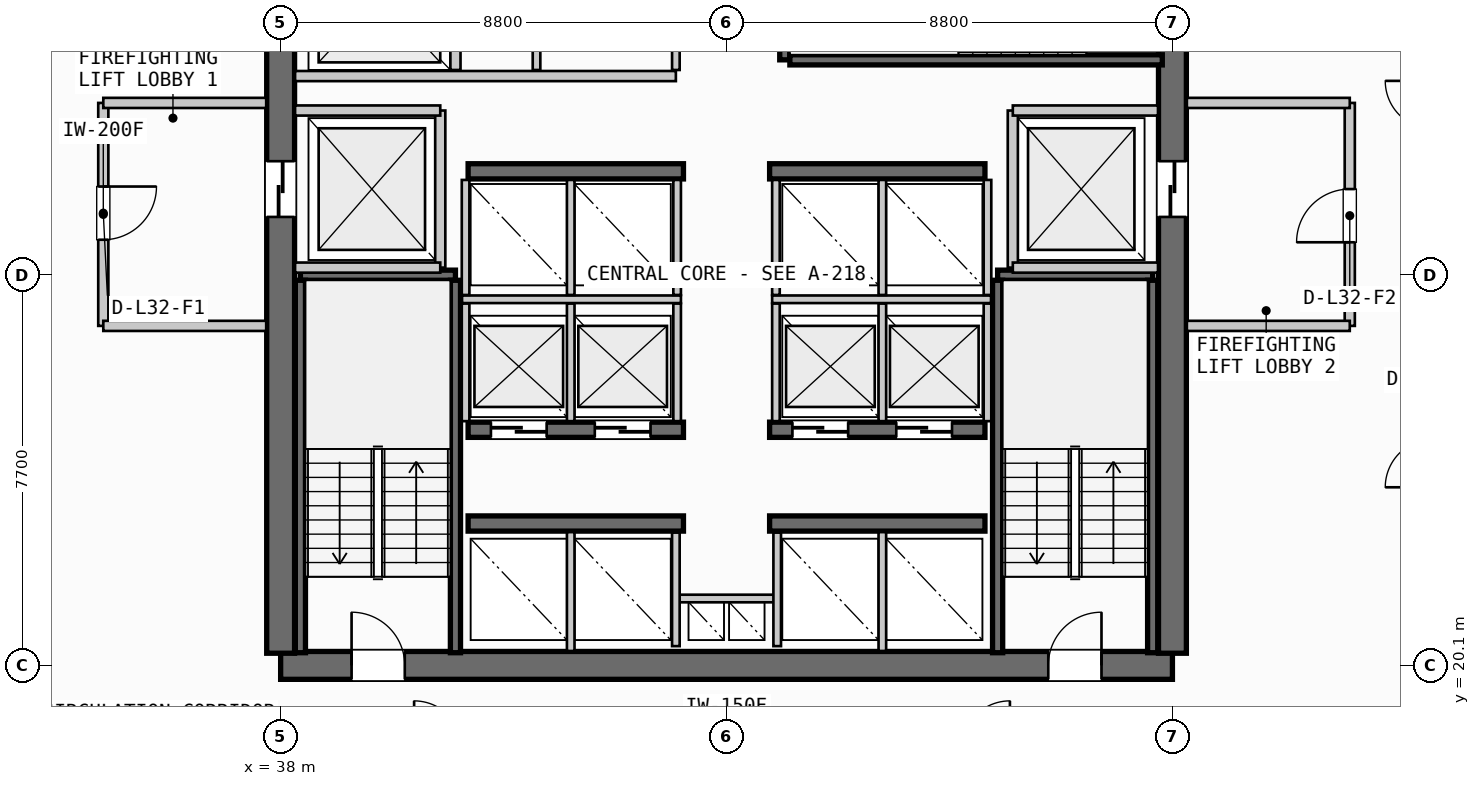
"""IFC4 building model, lengths in metres.
Left out: names, types, materials, properties, quantities, classifications, styles, units other than length and angle.
Written with IfcOpenShell. Run it as: python <this file> out.ifc"""

import sys

from ifc_helpers import new_model, si_unit, direction, frame, frame_2d, origin, place, context, subcontext, project, spatial, rectangle, extrude, source, transform, mapped, element, fill, save


model = new_model("IFC4")
c1 = context("Model", 3, precision=1e-05, world=origin(), true_north=direction((0.0, 1.0)))
c2 = subcontext(c1, "Body", "Model", "MODEL_VIEW")
j1 = project(units=[si_unit("LENGTHUNIT", "METRE"), si_unit("PLANEANGLEUNIT", "RADIAN")], contexts=[c1])
p1 = place(None, origin())
s1 = spatial("IfcSite", under=j1, at=p1, CompositionType="ELEMENT")
p2 = place(p1, origin())
s2 = spatial("IfcBuilding", under=s1, at=p2, CompositionType="ELEMENT")
p3 = place(p2, frame((0.0, 0.0, 128.8)))
s3 = spatial("IfcBuildingStorey", under=s2, at=p3, CompositionType="ELEMENT", Elevation=128.8)
p4 = place(p3, frame((38.0, 20.1, 0.0), z_axis=(0.0, 0.0, 1.0), x_axis=(1.0, 0.0, 0.0)))
e1 = element("IfcWall", 1, at=p4, inside=s3, PredefinedType="SHEAR", context=c2, shape_type="SweptSolid", body=[
    extrude(rectangle(XDim=17.6, YDim=0.55, at=frame_2d((8.8, 0.0))), origin(), (0.0, 0.0, 1.0), 3.3),
])
p5 = place(p4, frame((1.4, 0.0, 0.0)))
e2 = element("IfcOpeningElement", 2, at=p5, cuts=e1, PredefinedType="OPENING", context=c2, shape_type="SweptSolid", body=[
    extrude(rectangle(XDim=1.05, YDim=2.15, at=frame_2d((0.525, 1.075))), frame((0.0, 0.285, 0.0), z_axis=(0.0, -1.0, 0.0), x_axis=(1.0, 0.0, 0.0)), (0.0, 0.0, 1.0), 0.57),
])
p6 = place(p4, frame((15.15, 0.0, 0.0)))
e3 = element("IfcOpeningElement", 3, at=p6, cuts=e1, PredefinedType="OPENING", context=c2, shape_type="SweptSolid", body=[
    extrude(rectangle(XDim=1.05, YDim=2.15, at=frame_2d((0.525, 1.075))), frame((0.0, 0.285, 0.0), z_axis=(0.0, -1.0, 0.0), x_axis=(1.0, 0.0, 0.0)), (0.0, 0.0, 1.0), 0.57),
])
p7 = place(p3, frame((38.0, 35.26, 0.0), z_axis=(0.0, 0.0, 1.0), x_axis=(0.0, -1.0, 0.0)))
e4 = element("IfcWall", 4, at=p7, inside=s3, PredefinedType="SHEAR", context=c2, shape_type="SweptSolid", body=[
    extrude(rectangle(XDim=14.92, YDim=0.55, at=frame_2d((7.46, 0.0))), origin(), (0.0, 0.0, 1.0), 3.3),
])
p8 = place(p7, frame((5.21, 0.0, 0.0)))
e5 = element("IfcOpeningElement", 5, at=p8, cuts=e4, PredefinedType="OPENING", context=c2, shape_type="SweptSolid", body=[
    extrude(rectangle(XDim=1.1, YDim=2.2, at=frame_2d((0.55, 1.1))), frame((0.0, 0.285, 0.0), z_axis=(0.0, -1.0, 0.0), x_axis=(1.0, 0.0, 0.0)), (0.0, 0.0, 1.0), 0.57),
])
p9 = place(p3, frame((55.6, 20.34, 0.0), z_axis=(0.0, 0.0, 1.0), x_axis=(0.0, 1.0, 0.0)))
e6 = element("IfcWall", 6, at=p9, inside=s3, PredefinedType="SHEAR", context=c2, shape_type="SweptSolid", body=[
    extrude(rectangle(XDim=14.92, YDim=0.55, at=frame_2d((7.46, 0.0))), origin(), (0.0, 0.0, 1.0), 3.3),
])
p10 = place(p9, frame((12.71, 0.0, 0.0)))
e7 = element("IfcOpeningElement", 7, at=p10, cuts=e6, PredefinedType="OPENING", context=c2, shape_type="SweptSolid", body=[
    extrude(rectangle(XDim=1.05, YDim=2.15, at=frame_2d((0.525, 1.075))), frame((0.0, 0.285, 0.0), z_axis=(0.0, -1.0, 0.0), x_axis=(1.0, 0.0, 0.0)), (0.0, 0.0, 1.0), 0.57),
])
p11 = place(p9, frame((8.61, 0.0, 0.0)))
e8 = element("IfcOpeningElement", 8, at=p11, cuts=e6, PredefinedType="OPENING", context=c2, shape_type="SweptSolid", body=[
    extrude(rectangle(XDim=1.1, YDim=2.2, at=frame_2d((0.55, 1.1))), frame((0.0, 0.285, 0.0), z_axis=(0.0, -1.0, 0.0), x_axis=(1.0, 0.0, 0.0)), (0.0, 0.0, 1.0), 0.57),
])
for number, where, z_axis, x_axis in (
    (9, (41.7, 22.9, 0.0), (0.0, 0.0, 1.0), (1.0, 0.0, 0.0)),
    (10, (47.65, 22.9, 0.0), (0.0, 0.0, 1.0), (1.0, 0.0, 0.0)),
):
    element("IfcWall", number, at=place(p3, frame(where, z_axis=z_axis, x_axis=x_axis)), inside=s3, PredefinedType="SHEAR", context=c2, shape_type="SweptSolid", body=[
        extrude(rectangle(XDim=4.25, YDim=0.3, at=frame_2d((2.125, 0.0))), origin(), (0.0, 0.0, 1.0), 3.3),
    ])
p12 = place(p3, frame((41.7, 24.75, 0.0), z_axis=(0.0, 0.0, 1.0), x_axis=(1.0, 0.0, 0.0)))
e11 = element("IfcWall", 11, at=p12, inside=s3, PredefinedType="SHEAR", context=c2, shape_type="SweptSolid", body=[
    extrude(rectangle(XDim=4.25, YDim=0.3, at=frame_2d((2.125, 0.0))), origin(), (0.0, 0.0, 1.0), 3.3),
])
p13 = place(p12, frame((0.45, 0.0, 0.0)))
e12 = element("IfcOpeningElement", 12, at=p13, cuts=e11, PredefinedType="OPENING", context=c2, shape_type="SweptSolid", body=[
    extrude(rectangle(XDim=1.1, YDim=2.2, at=frame_2d((0.55, 1.1))), frame((0.0, 0.16, 0.0), z_axis=(0.0, -1.0, 0.0), x_axis=(1.0, 0.0, 0.0)), (0.0, 0.0, 1.0), 0.32),
])
p14 = place(p12, frame((2.5, 0.0, 0.0)))
e13 = element("IfcOpeningElement", 13, at=p14, cuts=e11, PredefinedType="OPENING", context=c2, shape_type="SweptSolid", body=[
    extrude(rectangle(XDim=1.1, YDim=2.2, at=frame_2d((0.55, 1.1))), frame((0.0, 0.16, 0.0), z_axis=(0.0, -1.0, 0.0), x_axis=(1.0, 0.0, 0.0)), (0.0, 0.0, 1.0), 0.32),
])
p15 = place(p3, frame((47.65, 24.75, 0.0), z_axis=(0.0, 0.0, 1.0), x_axis=(1.0, 0.0, 0.0)))
e14 = element("IfcWall", 14, at=p15, inside=s3, PredefinedType="SHEAR", context=c2, shape_type="SweptSolid", body=[
    extrude(rectangle(XDim=4.25, YDim=0.3, at=frame_2d((2.125, 0.0))), origin(), (0.0, 0.0, 1.0), 3.3),
])
p16 = place(p15, frame((0.45, 0.0, 0.0)))
e15 = element("IfcOpeningElement", 15, at=p16, cuts=e14, PredefinedType="OPENING", context=c2, shape_type="SweptSolid", body=[
    extrude(rectangle(XDim=1.1, YDim=2.2, at=frame_2d((0.55, 1.1))), frame((0.0, 0.16, 0.0), z_axis=(0.0, -1.0, 0.0), x_axis=(1.0, 0.0, 0.0)), (0.0, 0.0, 1.0), 0.32),
])
p17 = place(p15, frame((2.5, 0.0, 0.0)))
e16 = element("IfcOpeningElement", 16, at=p17, cuts=e14, PredefinedType="OPENING", context=c2, shape_type="SweptSolid", body=[
    extrude(rectangle(XDim=1.1, YDim=2.2, at=frame_2d((0.55, 1.1))), frame((0.0, 0.16, 0.0), z_axis=(0.0, -1.0, 0.0), x_axis=(1.0, 0.0, 0.0)), (0.0, 0.0, 1.0), 0.32),
])
for number, where, z_axis, x_axis in (
    (17, (41.7, 29.85, 0.0), (0.0, 0.0, 1.0), (1.0, 0.0, 0.0)),
    (18, (47.65, 29.85, 0.0), (0.0, 0.0, 1.0), (1.0, 0.0, 0.0)),
):
    element("IfcWall", number, at=place(p3, frame(where, z_axis=z_axis, x_axis=x_axis)), inside=s3, PredefinedType="SHEAR", context=c2, shape_type="SweptSolid", body=[
        extrude(rectangle(XDim=4.25, YDim=0.3, at=frame_2d((2.125, 0.0))), origin(), (0.0, 0.0, 1.0), 3.3),
    ])
p18 = place(p3, frame((38.39, 27.8, 0.0), z_axis=(0.0, 0.0, 1.0), x_axis=(1.0, 0.0, 0.0)))
e19 = element("IfcWall", 19, at=p18, inside=s3, PredefinedType="SHEAR", context=c2, shape_type="SweptSolid", body=[
    extrude(rectangle(XDim=3.06, YDim=0.2, at=frame_2d((1.53, 0.0))), origin(), (0.0, 0.0, 1.0), 3.3),
])
for number, where, z_axis, x_axis in (
    (20, (41.45, 27.7, 0.0), (0.0, 0.0, 1.0), (0.0, -1.0, 0.0)),
    (21, (38.39, 20.35, 0.0), (0.0, 0.0, 1.0), (0.0, 1.0, 0.0)),
):
    element("IfcWall", number, at=place(p3, frame(where, z_axis=z_axis, x_axis=x_axis)), inside=s3, PredefinedType="SHEAR", context=c2, shape_type="SweptSolid", body=[
        extrude(rectangle(XDim=7.35, YDim=0.2, at=frame_2d((3.675, 0.0))), origin(), (0.0, 0.0, 1.0), 3.3),
    ])
p19 = place(p3, frame((52.15, 27.8, 0.0), z_axis=(0.0, 0.0, 1.0), x_axis=(1.0, 0.0, 0.0)))
e22 = element("IfcWall", 22, at=p19, inside=s3, PredefinedType="SHEAR", context=c2, shape_type="SweptSolid", body=[
    extrude(rectangle(XDim=3.06, YDim=0.2, at=frame_2d((1.53, 0.0))), origin(), (0.0, 0.0, 1.0), 3.3),
])
for number, where, z_axis, x_axis in (
    (23, (55.21, 27.7, 0.0), (0.0, 0.0, 1.0), (0.0, -1.0, 0.0)),
    (24, (52.15, 20.35, 0.0), (0.0, 0.0, 1.0), (0.0, 1.0, 0.0)),
):
    element("IfcWall", number, at=place(p3, frame(where, z_axis=z_axis, x_axis=x_axis)), inside=s3, PredefinedType="SHEAR", context=c2, shape_type="SweptSolid", body=[
        extrude(rectangle(XDim=7.35, YDim=0.2, at=frame_2d((3.675, 0.0))), origin(), (0.0, 0.0, 1.0), 3.3),
    ])
p20 = place(p3, frame((47.95, 32.05, 0.0), z_axis=(0.0, 0.0, 1.0), x_axis=(0.0, 1.0, 0.0)))
e25 = element("IfcWall", 25, at=p20, inside=s3, PredefinedType="SHEAR", context=c2, shape_type="SweptSolid", body=[
    extrude(rectangle(XDim=3.06, YDim=0.2, at=frame_2d((1.53, 0.0))), origin(), (0.0, 0.0, 1.0), 3.3),
])
p21 = place(p3, frame((55.4, 32.05, 0.0), z_axis=(0.0, 0.0, 1.0), x_axis=(-1.0, 0.0, 0.0)))
e26 = element("IfcWall", 26, at=p21, inside=s3, PredefinedType="SHEAR", context=c2, shape_type="SweptSolid", body=[
    extrude(rectangle(XDim=7.35, YDim=0.2, at=frame_2d((3.675, 0.0))), origin(), (0.0, 0.0, 1.0), 3.3),
])
p22 = place(p3, frame((45.8, 21.42, 0.0), z_axis=(0.0, 0.0, 1.0), x_axis=(1.0, 0.0, 0.0)))
e27 = element("IfcWall", 27, at=p22, inside=s3, PredefinedType="PARTITIONING", context=c2, shape_type="SweptSolid", body=[
    extrude(rectangle(XDim=2.0, YDim=0.15, at=frame_2d((1.0, 0.0))), origin(), (0.0, 0.0, 1.0), 2.445),
])
for number, where, z_axis, x_axis in (
    (28, (45.8, 20.48, 0.0), (0.0, 0.0, 1.0), (0.0, 1.0, 0.0)),
    (29, (47.8, 20.48, 0.0), (0.0, 0.0, 1.0), (0.0, 1.0, 0.0)),
):
    element("IfcWall", number, at=place(p3, frame(where, z_axis=z_axis, x_axis=x_axis)), inside=s3, PredefinedType="PARTITIONING", context=c2, shape_type="SweptSolid", body=[
        extrude(rectangle(XDim=2.24, YDim=0.15, at=frame_2d((1.12, 0.0))), origin(), (0.0, 0.0, 1.0), 2.445),
    ])
p23 = place(p3, frame((41.15, 27.95, 0.0), z_axis=(0.0, 0.0, 1.0), x_axis=(0.0, 1.0, 0.0)))
e30 = element("IfcWall", 30, at=p23, inside=s3, PredefinedType="PARTITIONING", context=c2, shape_type="SweptSolid", body=[
    extrude(rectangle(XDim=3.1, YDim=0.2, at=frame_2d((1.55, 0.0))), origin(), (0.0, 0.0, 1.0), 2.445),
])
for number, where, z_axis, x_axis in (
    (31, (38.285, 27.95, 0.0), (0.0, 0.0, 1.0), (1.0, 0.0, 0.0)),
    (32, (38.285, 31.05, 0.0), (0.0, 0.0, 1.0), (1.0, 0.0, 0.0)),
):
    element("IfcWall", number, at=place(p3, frame(where, z_axis=z_axis, x_axis=x_axis)), inside=s3, PredefinedType="PARTITIONING", context=c2, shape_type="SweptSolid", body=[
        extrude(rectangle(XDim=2.865, YDim=0.2, at=frame_2d((1.433, 0.0))), origin(), (0.0, 0.0, 1.0), 2.445),
    ])
p24 = place(p3, frame((34.5, 31.2, 0.0), z_axis=(0.0, 0.0, 1.0), x_axis=(0.0, -1.0, 0.0)))
e33 = element("IfcWall", 33, at=p24, inside=s3, PredefinedType="PARTITIONING", context=c2, shape_type="SweptSolid", body=[
    extrude(rectangle(XDim=4.4, YDim=0.2, at=frame_2d((2.2, 0.0))), origin(), (0.0, 0.0, 1.0), 2.445),
])
p25 = place(p24, frame((1.65, 0.0, 0.0)))
e34 = element("IfcOpeningElement", 34, at=p25, cuts=e33, PredefinedType="OPENING", context=c2, shape_type="SweptSolid", body=[
    extrude(rectangle(XDim=1.05, YDim=2.15, at=frame_2d((0.525, 1.075))), frame((0.0, 0.11, 0.0), z_axis=(0.0, -1.0, 0.0), x_axis=(1.0, 0.0, 0.0)), (0.0, 0.0, 1.0), 0.22),
])
for number, where, z_axis, x_axis in (
    (35, (34.5, 26.8, 0.0), (0.0, 0.0, 1.0), (1.0, 0.0, 0.0)),
    (36, (34.5, 31.2, 0.0), (0.0, 0.0, 1.0), (1.0, 0.0, 0.0)),
):
    element("IfcWall", number, at=place(p3, frame(where, z_axis=z_axis, x_axis=x_axis)), inside=s3, PredefinedType="PARTITIONING", context=c2, shape_type="SweptSolid", body=[
        extrude(rectangle(XDim=3.215, YDim=0.2, at=frame_2d((1.607, 0.0))), origin(), (0.0, 0.0, 1.0), 2.445),
    ])
p26 = place(p3, frame((52.45, 27.95, 0.0), z_axis=(0.0, 0.0, 1.0), x_axis=(0.0, 1.0, 0.0)))
e37 = element("IfcWall", 37, at=p26, inside=s3, PredefinedType="PARTITIONING", context=c2, shape_type="SweptSolid", body=[
    extrude(rectangle(XDim=3.1, YDim=0.2, at=frame_2d((1.55, 0.0))), origin(), (0.0, 0.0, 1.0), 2.445),
])
for number, where, z_axis, x_axis in (
    (38, (52.45, 27.95, 0.0), (0.0, 0.0, 1.0), (1.0, 0.0, 0.0)),
    (39, (52.45, 31.05, 0.0), (0.0, 0.0, 1.0), (1.0, 0.0, 0.0)),
):
    element("IfcWall", number, at=place(p3, frame(where, z_axis=z_axis, x_axis=x_axis)), inside=s3, PredefinedType="PARTITIONING", context=c2, shape_type="SweptSolid", body=[
        extrude(rectangle(XDim=2.865, YDim=0.2, at=frame_2d((1.433, 0.0))), origin(), (0.0, 0.0, 1.0), 2.445),
    ])
p27 = place(p3, frame((59.1, 26.8, 0.0), z_axis=(0.0, 0.0, 1.0), x_axis=(0.0, 1.0, 0.0)))
e40 = element("IfcWall", 40, at=p27, inside=s3, PredefinedType="PARTITIONING", context=c2, shape_type="SweptSolid", body=[
    extrude(rectangle(XDim=4.4, YDim=0.2, at=frame_2d((2.2, 0.0))), origin(), (0.0, 0.0, 1.0), 2.445),
])
p28 = place(p27, frame((1.65, 0.0, 0.0)))
e41 = element("IfcOpeningElement", 41, at=p28, cuts=e40, PredefinedType="OPENING", context=c2, shape_type="SweptSolid", body=[
    extrude(rectangle(XDim=1.05, YDim=2.15, at=frame_2d((0.525, 1.075))), frame((0.0, 0.11, 0.0), z_axis=(0.0, -1.0, 0.0), x_axis=(1.0, 0.0, 0.0)), (0.0, 0.0, 1.0), 0.22),
])
for number, where, z_axis, x_axis in (
    (42, (55.885, 26.8, 0.0), (0.0, 0.0, 1.0), (1.0, 0.0, 0.0)),
    (43, (55.885, 31.2, 0.0), (0.0, 0.0, 1.0), (1.0, 0.0, 0.0)),
):
    element("IfcWall", number, at=place(p3, frame(where, z_axis=z_axis, x_axis=x_axis)), inside=s3, PredefinedType="PARTITIONING", context=c2, shape_type="SweptSolid", body=[
        extrude(rectangle(XDim=3.215, YDim=0.2, at=frame_2d((1.607, 0.0))), origin(), (0.0, 0.0, 1.0), 2.445),
    ])
for number, where, z_axis, x_axis in (
    (44, (43.725, 20.385, 0.0), (0.0, 0.0, 1.0), (0.0, 1.0, 0.0)),
    (45, (49.875, 20.385, 0.0), (0.0, 0.0, 1.0), (0.0, 1.0, 0.0)),
):
    element("IfcWall", number, at=place(p3, frame(where, z_axis=z_axis, x_axis=x_axis)), inside=s3, PredefinedType="PARTITIONING", context=c2, shape_type="SweptSolid", body=[
        extrude(rectangle(XDim=2.345, YDim=0.15, at=frame_2d((1.172, 0.0))), origin(), (0.0, 0.0, 1.0), 2.445),
    ])
p29 = place(p3, frame((41.58, 27.325, 0.0), z_axis=(0.0, 0.0, 1.0), x_axis=(1.0, 0.0, 0.0)))
e46 = element("IfcWall", 46, at=p29, inside=s3, PredefinedType="PARTITIONING", context=c2, shape_type="SweptSolid", body=[
    extrude(rectangle(XDim=4.32, YDim=0.15, at=frame_2d((2.16, 0.0))), origin(), (0.0, 0.0, 1.0), 2.445),
])
p30 = place(p3, frame((47.7, 27.325, 0.0), z_axis=(0.0, 0.0, 1.0), x_axis=(1.0, 0.0, 0.0)))
e47 = element("IfcWall", 47, at=p30, inside=s3, PredefinedType="PARTITIONING", context=c2, shape_type="SweptSolid", body=[
    extrude(rectangle(XDim=4.32, YDim=0.15, at=frame_2d((2.16, 0.0))), origin(), (0.0, 0.0, 1.0), 2.445),
])
for number, where, z_axis, x_axis in (
    (48, (41.65, 24.92, 0.0), (0.0, 0.0, 1.0), (0.0, 1.0, 0.0)),
    (49, (43.725, 24.92, 0.0), (0.0, 0.0, 1.0), (0.0, 1.0, 0.0)),
    (50, (45.825, 24.92, 0.0), (0.0, 0.0, 1.0), (0.0, 1.0, 0.0)),
    (51, (47.775, 24.92, 0.0), (0.0, 0.0, 1.0), (0.0, 1.0, 0.0)),
    (52, (49.875, 24.92, 0.0), (0.0, 0.0, 1.0), (0.0, 1.0, 0.0)),
    (53, (51.95, 24.92, 0.0), (0.0, 0.0, 1.0), (0.0, 1.0, 0.0)),
):
    element("IfcWall", number, at=place(p3, frame(where, z_axis=z_axis, x_axis=x_axis)), inside=s3, PredefinedType="PARTITIONING", context=c2, shape_type="SweptSolid", body=[
        extrude(rectangle(XDim=2.32, YDim=0.15, at=frame_2d((1.16, 0.0))), origin(), (0.0, 0.0, 1.0), 2.445),
    ])
for number, where, z_axis, x_axis in (
    (54, (41.65, 27.41, 0.0), (0.0, 0.0, 1.0), (0.0, 1.0, 0.0)),
    (55, (43.725, 27.41, 0.0), (0.0, 0.0, 1.0), (0.0, 1.0, 0.0)),
    (56, (45.825, 27.41, 0.0), (0.0, 0.0, 1.0), (0.0, 1.0, 0.0)),
    (57, (47.775, 27.41, 0.0), (0.0, 0.0, 1.0), (0.0, 1.0, 0.0)),
    (58, (49.875, 27.41, 0.0), (0.0, 0.0, 1.0), (0.0, 1.0, 0.0)),
    (59, (51.95, 27.41, 0.0), (0.0, 0.0, 1.0), (0.0, 1.0, 0.0)),
):
    element("IfcWall", number, at=place(p3, frame(where, z_axis=z_axis, x_axis=x_axis)), inside=s3, PredefinedType="PARTITIONING", context=c2, shape_type="SweptSolid", body=[
        extrude(rectangle(XDim=2.27, YDim=0.15, at=frame_2d((1.135, 0.0))), origin(), (0.0, 0.0, 1.0), 2.445),
    ])
p31 = place(p3, frame((41.45, 31.85, 0.0), z_axis=(0.0, 0.0, 1.0), x_axis=(0.0, 1.0, 0.0)))
e60 = element("IfcWall", 60, at=p31, inside=s3, PredefinedType="PARTITIONING", context=c2, shape_type="SweptSolid", body=[
    extrude(rectangle(XDim=3.365, YDim=0.2, at=frame_2d((1.683, 0.0))), origin(), (0.0, 0.0, 1.0), 2.445),
])
p32 = place(p3, frame((38.285, 31.73, 0.0), z_axis=(0.0, 0.0, 1.0), x_axis=(1.0, 0.0, 0.0)))
e61 = element("IfcWall", 61, at=p32, inside=s3, PredefinedType="PARTITIONING", context=c2, shape_type="SweptSolid", body=[
    extrude(rectangle(XDim=7.515, YDim=0.2, at=frame_2d((3.758, 0.0))), origin(), (0.0, 0.0, 1.0), 2.445),
])
p33 = place(p3, frame((45.8, 31.85, 0.0), z_axis=(0.0, 0.0, 1.0), x_axis=(0.0, 1.0, 0.0)))
e62 = element("IfcWall", 62, at=p33, inside=s3, PredefinedType="PARTITIONING", context=c2, shape_type="SweptSolid", body=[
    extrude(rectangle(XDim=3.365, YDim=0.15, at=frame_2d((1.683, 0.0))), origin(), (0.0, 0.0, 1.0), 2.445),
])
p34 = place(p3, frame((43.05, 31.85, 0.0), z_axis=(0.0, 0.0, 1.0), x_axis=(0.0, 1.0, 0.0)))
e63 = element("IfcWall", 63, at=p34, inside=s3, PredefinedType="PLUMBINGWALL", context=c2, shape_type="SweptSolid", body=[
    extrude(rectangle(XDim=3.365, YDim=0.15, at=frame_2d((1.683, 0.0))), origin(), (0.0, 0.0, 1.0), 2.445),
])
m1 = source(origin(), c2, "Body", "SweptSolid", [
    extrude(rectangle(XDim=1.05, YDim=2.15, at=frame_2d((0.525, 1.075))), frame((0.0, 0.025, 0.0), z_axis=(0.0, -1.0, 0.0), x_axis=(1.0, 0.0, 0.0)), (0.0, 0.0, 1.0), 0.05),
])
p35 = place(p5, origin())
e64 = element("IfcDoor", 64, at=p35, inside=s3, OperationType="SINGLE_SWING_LEFT", PredefinedType="DOOR", context=c2, shape_type="MappedRepresentation", body=[
    mapped(m1, transform((0.0, 0.0, 0.0), scale=1.0)),
])
fill(e2, e64)
p36 = place(p6, origin())
e65 = element("IfcDoor", 65, at=p36, inside=s3, OperationType="SINGLE_SWING_RIGHT", PredefinedType="DOOR", context=c2, shape_type="MappedRepresentation", body=[
    mapped(m1, transform((0.0, 0.0, 0.0), scale=1.0)),
])
fill(e3, e65)
m2 = source(origin(), c2, "Body", "SweptSolid", [
    extrude(rectangle(XDim=1.1, YDim=2.2, at=frame_2d((0.55, 1.1))), frame((0.0, 0.025, 0.0), z_axis=(0.0, -1.0, 0.0), x_axis=(1.0, 0.0, 0.0)), (0.0, 0.0, 1.0), 0.05),
])
p37 = place(p8, origin())
e66 = element("IfcDoor", 66, at=p37, inside=s3, OperationType="SLIDING_TO_LEFT", PredefinedType="DOOR", context=c2, shape_type="MappedRepresentation", body=[
    mapped(m2, transform((0.0, 0.0, 0.0), scale=1.0)),
])
fill(e5, e66)
p38 = place(p11, origin())
e67 = element("IfcDoor", 67, at=p38, inside=s3, OperationType="SLIDING_TO_RIGHT", PredefinedType="DOOR", context=c2, shape_type="MappedRepresentation", body=[
    mapped(m2, transform((0.0, 0.0, 0.0), scale=1.0)),
])
fill(e8, e67)
p39 = place(p13, origin())
e68 = element("IfcDoor", 68, at=p39, inside=s3, OperationType="SLIDING_TO_RIGHT", PredefinedType="DOOR", context=c2, shape_type="MappedRepresentation", body=[
    mapped(m2, transform((0.0, 0.0, 0.0), scale=1.0)),
])
fill(e12, e68)
p40 = place(p14, origin())
e69 = element("IfcDoor", 69, at=p40, inside=s3, OperationType="SLIDING_TO_RIGHT", PredefinedType="DOOR", context=c2, shape_type="MappedRepresentation", body=[
    mapped(m2, transform((0.0, 0.0, 0.0), scale=1.0)),
])
fill(e13, e69)
p41 = place(p16, origin())
e70 = element("IfcDoor", 70, at=p41, inside=s3, OperationType="SLIDING_TO_RIGHT", PredefinedType="DOOR", context=c2, shape_type="MappedRepresentation", body=[
    mapped(m2, transform((0.0, 0.0, 0.0), scale=1.0)),
])
fill(e15, e70)
p42 = place(p17, origin())
e71 = element("IfcDoor", 71, at=p42, inside=s3, OperationType="SLIDING_TO_RIGHT", PredefinedType="DOOR", context=c2, shape_type="MappedRepresentation", body=[
    mapped(m2, transform((0.0, 0.0, 0.0), scale=1.0)),
])
fill(e16, e71)
p43 = place(p25, origin())
e72 = element("IfcDoor", 72, at=p43, inside=s3, OperationType="SINGLE_SWING_LEFT", PredefinedType="DOOR", context=c2, shape_type="MappedRepresentation", body=[
    mapped(m1, transform((0.0, 0.0, 0.0), scale=1.0)),
])
fill(e34, e72)
p44 = place(p28, origin())
e73 = element("IfcDoor", 73, at=p44, inside=s3, OperationType="SINGLE_SWING_LEFT", PredefinedType="DOOR", context=c2, shape_type="MappedRepresentation", body=[
    mapped(m1, transform((0.0, 0.0, 0.0), scale=1.0)),
])
fill(e41, e73)
save(model, sys.argv[1])
